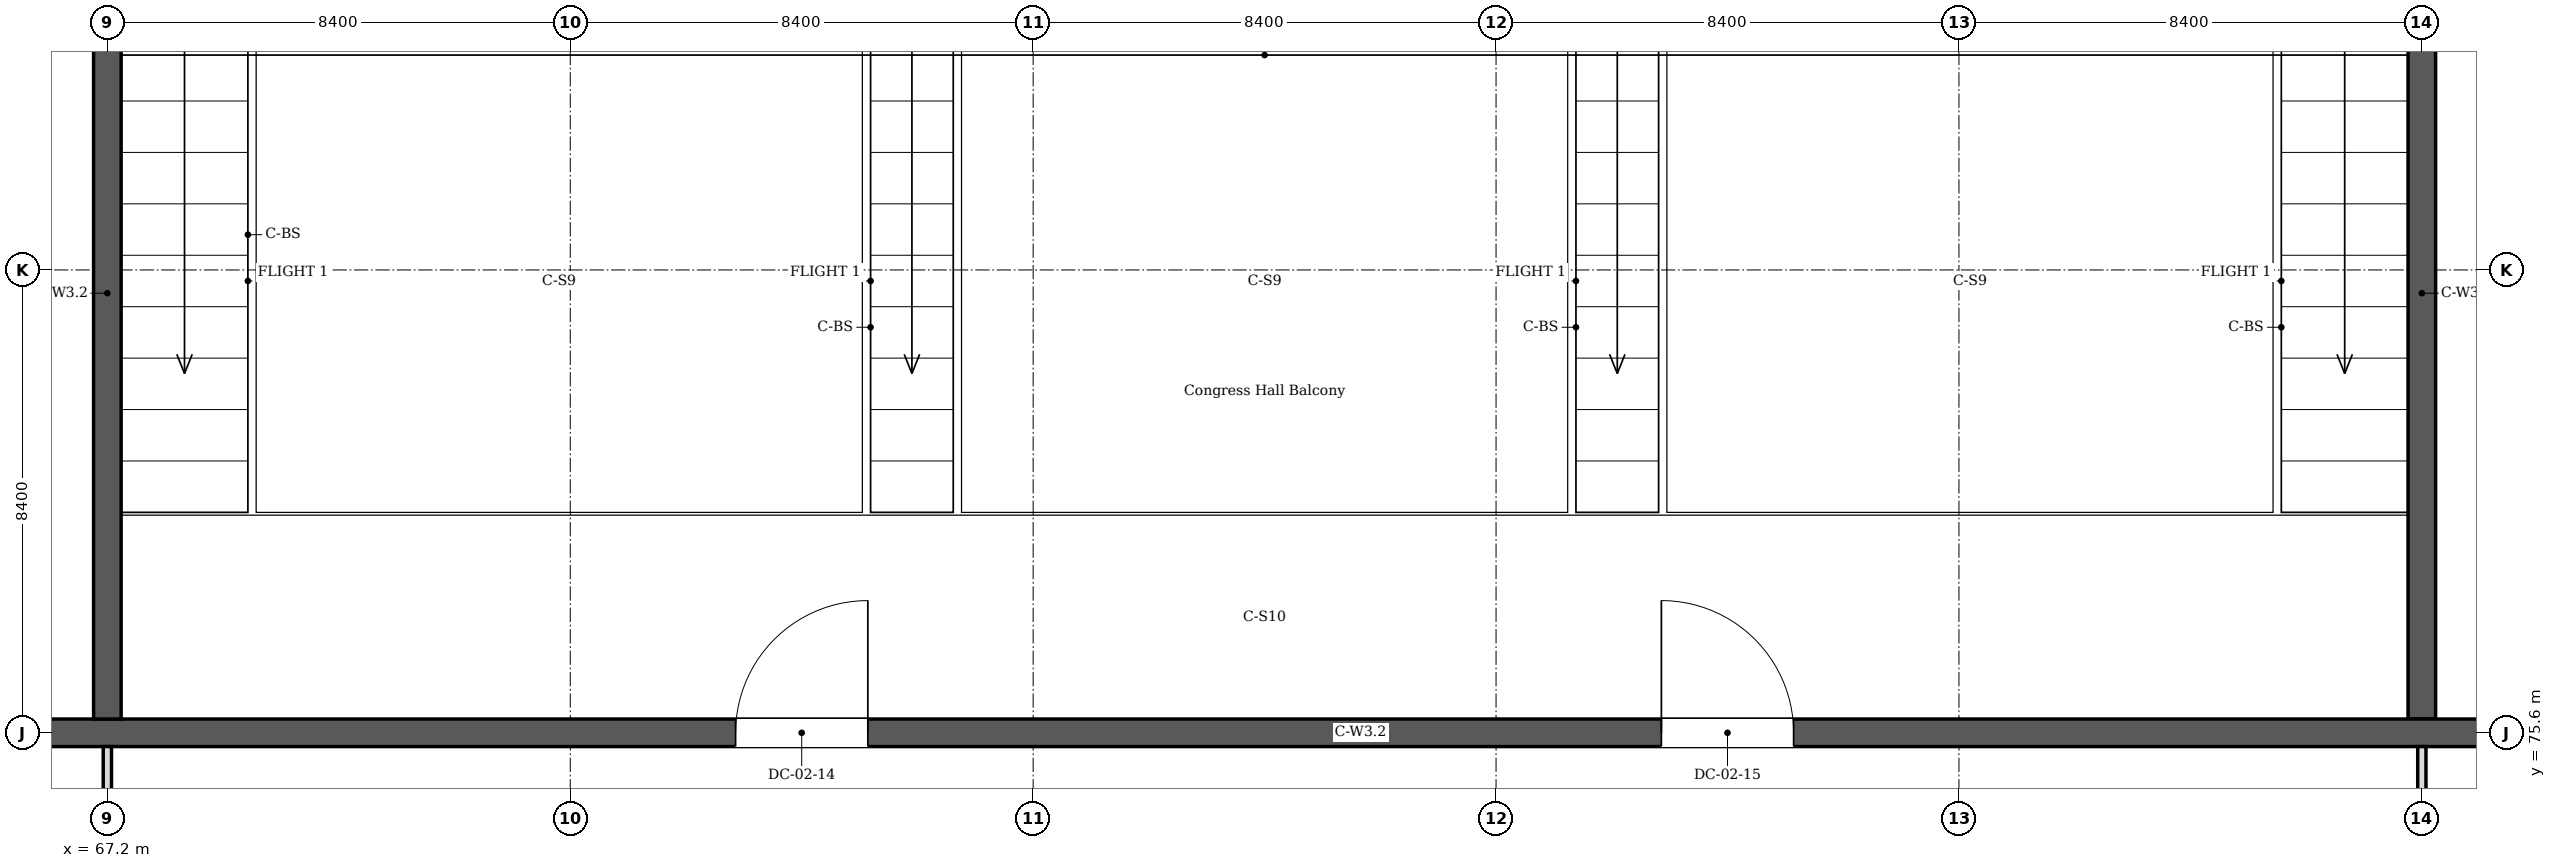
"""IFC4 building model, lengths in metres.
Left out: names, types, materials, properties, quantities, classifications, styles, units other than length and angle.
Written with IfcOpenShell. Run it as: python <this file> out.ifc"""

import sys

from ifc_helpers import new_model, si_unit, direction, frame, frame_2d, origin, place, context, subcontext, project, spatial, rectangle, extrude, element, fill, save


model = new_model("IFC4")
c1 = context("Model", 3, precision=1e-05, world=origin(), true_north=direction((0.0, 1.0)))
c2 = subcontext(c1, "Body", "Model", "MODEL_VIEW")
j1 = project(units=[si_unit("LENGTHUNIT", "METRE"), si_unit("PLANEANGLEUNIT", "RADIAN")], contexts=[c1])
p1 = place(None, origin())
s1 = spatial("IfcSite", under=j1, at=p1, CompositionType="ELEMENT")
p2 = place(p1, origin())
s2 = spatial("IfcBuilding", under=s1, at=p2, CompositionType="ELEMENT")
p3 = place(p2, frame((0.0, 0.0, 10.2)))
s3 = spatial("IfcBuildingStorey", under=s2, at=p3, CompositionType="ELEMENT", Elevation=10.2)
p4 = place(p3, frame((59.25, 75.6, 0.0), z_axis=(0.0, 0.0, 1.0), x_axis=(1.0, 0.0, 0.0)))
e1 = element("IfcWall", 1, at=p4, inside=s3, PredefinedType="SOLIDWALL", context=c2, shape_type="SweptSolid", body=[
    extrude(rectangle(XDim=57.9, YDim=0.5, at=frame_2d((28.95, 0.0))), origin(), (0.0, 0.0, 1.0), 4.2),
])
p5 = place(p4, frame((19.35, 0.0, 0.0)))
e2 = element("IfcOpeningElement", 2, at=p5, cuts=e1, PredefinedType="OPENING", context=c2, shape_type="SweptSolid", body=[
    extrude(rectangle(XDim=2.4, YDim=2.1, at=frame_2d((1.2, 1.05))), frame((0.0, 0.26, 0.0), z_axis=(0.0, -1.0, 0.0), x_axis=(1.0, 0.0, 0.0)), (0.0, 0.0, 1.0), 0.52),
])
p6 = place(p4, frame((36.15, 0.0, 0.0)))
e3 = element("IfcOpeningElement", 3, at=p6, cuts=e1, PredefinedType="OPENING", context=c2, shape_type="SweptSolid", body=[
    extrude(rectangle(XDim=2.4, YDim=2.1, at=frame_2d((1.2, 1.05))), frame((0.0, 0.26, 0.0), z_axis=(0.0, -1.0, 0.0), x_axis=(1.0, 0.0, 0.0)), (0.0, 0.0, 1.0), 0.52),
])
p7 = place(p3, frame((67.2, 75.85, 0.0), z_axis=(0.0, 0.0, 1.0), x_axis=(0.0, 1.0, 0.0)))
e4 = element("IfcWall", 4, at=p7, inside=s3, PredefinedType="SOLIDWALL", context=c2, shape_type="SweptSolid", body=[
    extrude(rectangle(XDim=41.5, YDim=0.5, at=frame_2d((20.75, 0.0))), origin(), (0.0, 0.0, 1.0), 4.2),
])
p8 = place(p7, frame((33.7, 0.0, 0.0)))
e5 = element("IfcOpeningElement", 5, at=p8, cuts=e4, PredefinedType="OPENING", context=c2, shape_type="SweptSolid", body=[
    extrude(rectangle(XDim=2.0, YDim=2.1, at=frame_2d((1.0, 1.05))), frame((0.0, 0.26, 0.0), z_axis=(0.0, -1.0, 0.0), x_axis=(1.0, 0.0, 0.0)), (0.0, 0.0, 1.0), 0.52),
])
p9 = place(p3, frame((109.2, 117.35, 0.0), z_axis=(0.0, 0.0, 1.0), x_axis=(0.0, -1.0, 0.0)))
e6 = element("IfcWall", 6, at=p9, inside=s3, PredefinedType="SOLIDWALL", context=c2, shape_type="SweptSolid", body=[
    extrude(rectangle(XDim=41.5, YDim=0.5, at=frame_2d((20.75, 0.0))), origin(), (0.0, 0.0, 1.0), 4.2),
])
p10 = place(p9, frame((5.8, 0.0, 0.0)))
e7 = element("IfcOpeningElement", 7, at=p10, cuts=e6, PredefinedType="OPENING", context=c2, shape_type="SweptSolid", body=[
    extrude(rectangle(XDim=2.0, YDim=2.1, at=frame_2d((1.0, 1.05))), frame((0.0, 0.26, 0.0), z_axis=(0.0, -1.0, 0.0), x_axis=(1.0, 0.0, 0.0)), (0.0, 0.0, 1.0), 0.52),
])
p11 = place(p3, frame((67.2, 67.45, 0.0), z_axis=(0.0, 0.0, 1.0), x_axis=(0.0, 1.0, 0.0)))
e8 = element("IfcWall", 8, at=p11, inside=s3, PredefinedType="PARTITIONING", context=c2, shape_type="SweptSolid", body=[
    extrude(rectangle(XDim=7.9, YDim=0.15, at=frame_2d((3.95, 0.0))), origin(), (0.0, 0.0, 1.0), 3.55),
])
p12 = place(p11, frame((3.35, 0.0, 0.0)))
e9 = element("IfcOpeningElement", 9, at=p12, cuts=e8, PredefinedType="OPENING", context=c2, shape_type="SweptSolid", body=[
    extrude(rectangle(XDim=1.2, YDim=2.1, at=frame_2d((0.6, 1.05))), frame((0.0, 0.085, 0.0), z_axis=(0.0, -1.0, 0.0), x_axis=(1.0, 0.0, 0.0)), (0.0, 0.0, 1.0), 0.17),
])
p13 = place(p3, frame((109.2, 67.45, 0.0), z_axis=(0.0, 0.0, 1.0), x_axis=(0.0, 1.0, 0.0)))
e10 = element("IfcWall", 10, at=p13, inside=s3, PredefinedType="PARTITIONING", context=c2, shape_type="SweptSolid", body=[
    extrude(rectangle(XDim=7.9, YDim=0.15, at=frame_2d((3.95, 0.0))), origin(), (0.0, 0.0, 1.0), 3.55),
])
p14 = place(p13, frame((0.75, 0.0, 0.0)))
e11 = element("IfcOpeningElement", 11, at=p14, cuts=e10, PredefinedType="OPENING", context=c2, shape_type="SweptSolid", body=[
    extrude(rectangle(XDim=1.0, YDim=2.1, at=frame_2d((0.5, 1.05))), frame((0.0, 0.085, 0.0), z_axis=(0.0, -1.0, 0.0), x_axis=(1.0, 0.0, 0.0)), (0.0, 0.0, 1.0), 0.17),
])
p15 = place(p13, frame((3.45, 0.0, 0.0)))
e12 = element("IfcOpeningElement", 12, at=p15, cuts=e10, PredefinedType="OPENING", context=c2, shape_type="SweptSolid", body=[
    extrude(rectangle(XDim=1.0, YDim=2.1, at=frame_2d((0.5, 1.05))), frame((0.0, 0.085, 0.0), z_axis=(0.0, -1.0, 0.0), x_axis=(1.0, 0.0, 0.0)), (0.0, 0.0, 1.0), 0.17),
])
p16 = place(p13, frame((6.05, 0.0, 0.0)))
e13 = element("IfcOpeningElement", 13, at=p16, cuts=e10, PredefinedType="OPENING", context=c2, shape_type="SweptSolid", body=[
    extrude(rectangle(XDim=1.0, YDim=2.1, at=frame_2d((0.5, 1.05))), frame((0.0, 0.085, 0.0), z_axis=(0.0, -1.0, 0.0), x_axis=(1.0, 0.0, 0.0)), (0.0, 0.0, 1.0), 0.17),
])
p17 = place(p5, origin())
e14 = element("IfcDoor", 14, at=p17, inside=s3, OperationType="DOUBLE_DOOR_DOUBLE_SWING", PredefinedType="DOOR", context=c2, shape_type="SweptSolid", body=[
    extrude(rectangle(XDim=2.4, YDim=2.1, at=frame_2d((1.2, 1.05))), frame((0.0, 0.025, 0.0), z_axis=(0.0, -1.0, 0.0), x_axis=(1.0, 0.0, 0.0)), (0.0, 0.0, 1.0), 0.05),
])
fill(e2, e14)
p18 = place(p6, origin())
e15 = element("IfcDoor", 15, at=p18, inside=s3, OperationType="DOUBLE_DOOR_DOUBLE_SWING", PredefinedType="DOOR", context=c2, shape_type="SweptSolid", body=[
    extrude(rectangle(XDim=2.4, YDim=2.1, at=frame_2d((1.2, 1.05))), frame((0.0, 0.025, 0.0), z_axis=(0.0, -1.0, 0.0), x_axis=(1.0, 0.0, 0.0)), (0.0, 0.0, 1.0), 0.05),
])
fill(e3, e15)
save(model, sys.argv[1])
